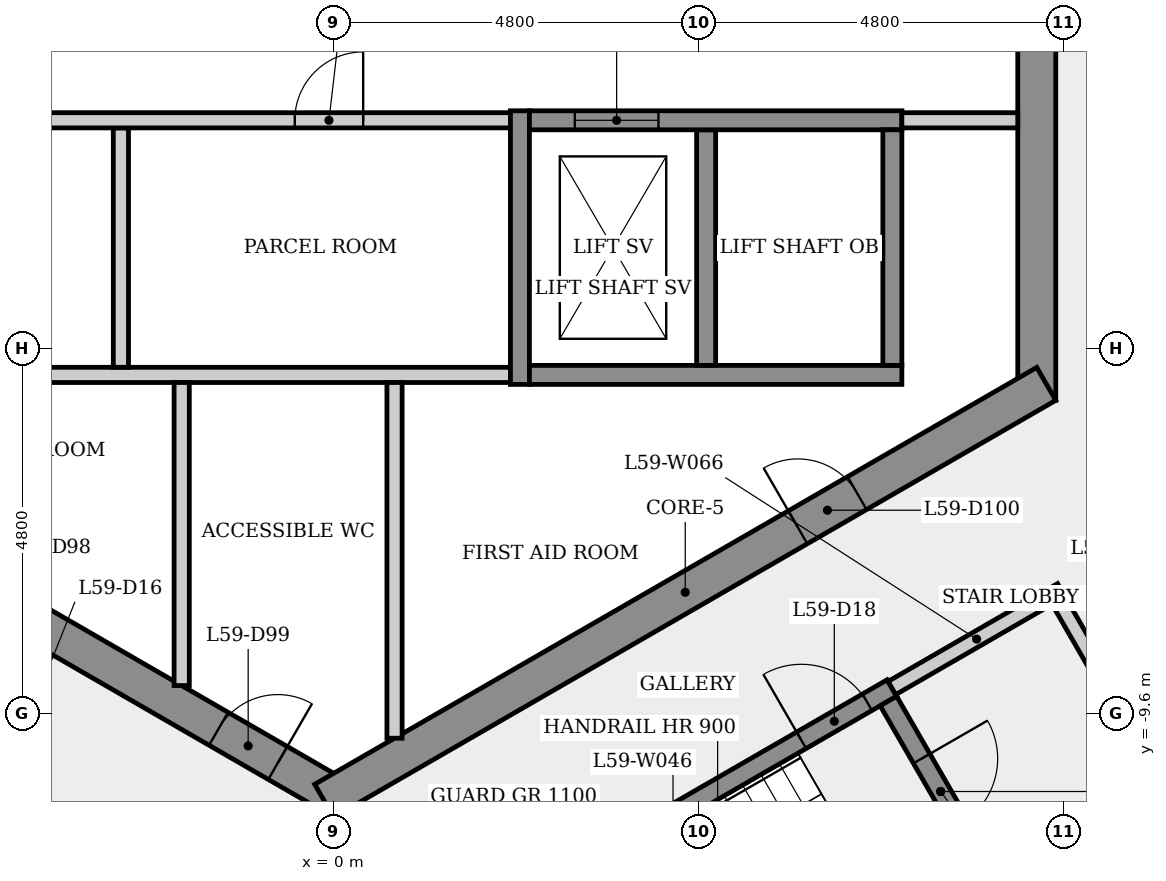
"""IFC4 building model, lengths in metres.
Left out: names, types, materials, properties, quantities, classifications, styles, units other than length and angle.
Written with IfcOpenShell. Run it as: python <this file> out.ifc"""

import sys

from ifc_helpers import new_model, si_unit, direction, frame, frame_2d, origin, place, context, subcontext, project, spatial, rectangle, extrude, element, fill, save


model = new_model("IFC4")
c1 = context("Model", 3, precision=1e-05, world=origin(), true_north=direction((0.0, 1.0)))
c2 = subcontext(c1, "Body", "Model", "MODEL_VIEW")
j1 = project(units=[si_unit("LENGTHUNIT", "METRE"), si_unit("PLANEANGLEUNIT", "RADIAN")], contexts=[c1])
p1 = place(None, origin())
s1 = spatial("IfcSite", under=j1, at=p1, CompositionType="ELEMENT")
p2 = place(p1, origin())
s2 = spatial("IfcBuilding", under=s1, at=p2, CompositionType="ELEMENT")
p3 = place(p2, frame((0.0, 0.0, 222.3)))
s3 = spatial("IfcBuildingStorey", under=s2, at=p3, CompositionType="ELEMENT", Elevation=222.3)
p4 = place(p3, frame((9.25, -5.485, 0.0), z_axis=(0.0, 0.0, 1.0), x_axis=(0.0, 1.0, 0.0)))
e1 = element("IfcWall", 1, at=p4, inside=s3, PredefinedType="SHEAR", context=c2, shape_type="SweptSolid", body=[
    extrude(rectangle(XDim=10.97, YDim=0.5, at=frame_2d((5.485, 0.0))), origin(), (0.0, 0.0, 1.0), 3.4),
])
p5 = place(p4, frame((4.685, 0.0, 0.0)))
e2 = element("IfcOpeningElement", 2, at=p5, cuts=e1, PredefinedType="OPENING", context=c2, shape_type="SweptSolid", body=[
    extrude(rectangle(XDim=1.6, YDim=2.1, at=frame_2d((0.8, 1.05))), frame((0.0, 0.26, 0.0), z_axis=(0.0, -1.0, 0.0), x_axis=(1.0, 0.0, 0.0)), (0.0, 0.0, 1.0), 0.52),
])
p6 = place(p3, frame((-9.375, -5.268, 0.0), z_axis=(0.0, 0.0, 1.0), x_axis=(0.866023993627, -0.500002442456, 0.0)))
e3 = element("IfcWall", 3, at=p6, inside=s3, PredefinedType="SHEAR", context=c2, shape_type="SweptSolid", body=[
    extrude(rectangle(XDim=10.97, YDim=0.5, at=frame_2d((5.485, 0.0))), origin(), (0.0, 0.0, 1.0), 3.4),
])
p7 = place(p6, frame((3.857, 0.0, 0.0)))
e4 = element("IfcOpeningElement", 4, at=p7, cuts=e3, PredefinedType="OPENING", context=c2, shape_type="SweptSolid", body=[
    extrude(rectangle(XDim=0.9, YDim=2.1, at=frame_2d((0.45, 1.05))), frame((0.0, 0.26, 0.0), z_axis=(0.0, -1.0, 0.0), x_axis=(1.0, 0.0, 0.0)), (0.0, 0.0, 1.0), 0.52),
])
p8 = place(p6, frame((9.076, 0.0, 0.0)))
e5 = element("IfcOpeningElement", 5, at=p8, cuts=e3, PredefinedType="OPENING", context=c2, shape_type="SweptSolid", body=[
    extrude(rectangle(XDim=0.9, YDim=2.1, at=frame_2d((0.45, 1.05))), frame((0.0, 0.26, 0.0), z_axis=(0.0, -1.0, 0.0), x_axis=(1.0, 0.0, 0.0)), (0.0, 0.0, 1.0), 0.52),
])
p9 = place(p3, frame((-0.125, -10.753, 0.0), z_axis=(0.0, 0.0, 1.0), x_axis=(0.866023993627, 0.500002442456, 0.0)))
e6 = element("IfcWall", 6, at=p9, inside=s3, PredefinedType="SHEAR", context=c2, shape_type="SweptSolid", body=[
    extrude(rectangle(XDim=10.97, YDim=0.5, at=frame_2d((5.485, 0.0))), origin(), (0.0, 0.0, 1.0), 3.4),
])
p10 = place(p9, frame((7.195, 0.0, 0.0)))
e7 = element("IfcOpeningElement", 7, at=p10, cuts=e6, PredefinedType="OPENING", context=c2, shape_type="SweptSolid", body=[
    extrude(rectangle(XDim=0.9, YDim=2.1, at=frame_2d((0.45, 1.05))), frame((0.0, 0.26, 0.0), z_axis=(0.0, -1.0, 0.0), x_axis=(1.0, 0.0, 0.0)), (0.0, 0.0, 1.0), 0.52),
])
p11 = place(p3, frame((-9.0, -5.15, 0.0), z_axis=(0.0, 0.0, 1.0), x_axis=(1.0, 0.0, 0.0)))
e8 = element("IfcWall", 8, at=p11, inside=s3, PredefinedType="PARTITIONING", context=c2, shape_type="SweptSolid", body=[
    extrude(rectangle(XDim=11.325, YDim=0.2, at=frame_2d((5.663, 0.0))), origin(), (0.0, 0.0, 1.0), 3.05),
])
p12 = place(p3, frame((-6.435, -9.795, 0.0), z_axis=(0.0, 0.0, 1.0), x_axis=(0.866012907634, -0.500021643343, 0.0)))
e9 = element("IfcWall", 9, at=p12, inside=s3, PredefinedType="PARTITIONING", context=c2, shape_type="SweptSolid", body=[
    extrude(rectangle(XDim=4.45, YDim=0.2, at=frame_2d((2.225, 0.0))), origin(), (0.0, 0.0, 1.0), 3.05),
])
p13 = place(p12, frame((1.675, 0.0, 0.0)))
e10 = element("IfcOpeningElement", 10, at=p13, cuts=e9, PredefinedType="OPENING", context=c2, shape_type="SweptSolid", body=[
    extrude(rectangle(XDim=1.1, YDim=2.1, at=frame_2d((0.55, 1.05))), frame((0.0, 0.11, 0.0), z_axis=(0.0, -1.0, 0.0), x_axis=(1.0, 0.0, 0.0)), (0.0, 0.0, 1.0), 0.22),
])
p14 = place(p3, frame((-2.8, -1.9, 0.0), z_axis=(0.0, 0.0, 1.0), x_axis=(0.0, -1.0, 0.0)))
e11 = element("IfcWall", 11, at=p14, inside=s3, PredefinedType="PARTITIONING", context=c2, shape_type="SweptSolid", body=[
    extrude(rectangle(XDim=3.15, YDim=0.2, at=frame_2d((1.575, 0.0))), origin(), (0.0, 0.0, 1.0), 3.05),
])
p15 = place(p3, frame((-9.0, -1.8, 0.0), z_axis=(0.0, 0.0, 1.0), x_axis=(1.0, 0.0, 0.0)))
e12 = element("IfcWall", 12, at=p15, inside=s3, PredefinedType="PARTITIONING", context=c2, shape_type="SweptSolid", body=[
    extrude(rectangle(XDim=11.325, YDim=0.2, at=frame_2d((5.663, 0.0))), origin(), (0.0, 0.0, 1.0), 3.05),
])
p16 = place(p15, frame((2.635, 0.0, 0.0)))
e13 = element("IfcOpeningElement", 13, at=p16, cuts=e12, PredefinedType="OPENING", context=c2, shape_type="SweptSolid", body=[
    extrude(rectangle(XDim=0.9, YDim=2.1, at=frame_2d((0.45, 1.05))), frame((0.0, 0.11, 0.0), z_axis=(0.0, -1.0, 0.0), x_axis=(1.0, 0.0, 0.0)), (0.0, 0.0, 1.0), 0.22),
])
p17 = place(p15, frame((8.488, 0.0, 0.0)))
e14 = element("IfcOpeningElement", 14, at=p17, cuts=e12, PredefinedType="OPENING", context=c2, shape_type="SweptSolid", body=[
    extrude(rectangle(XDim=0.9, YDim=2.1, at=frame_2d((0.45, 1.05))), frame((0.0, 0.11, 0.0), z_axis=(0.0, -1.0, 0.0), x_axis=(1.0, 0.0, 0.0)), (0.0, 0.0, 1.0), 0.22),
])
p18 = place(p3, frame((-2.0, -5.25, 0.0), z_axis=(0.0, 0.0, 1.0), x_axis=(0.0, -1.0, 0.0)))
e15 = element("IfcWall", 15, at=p18, inside=s3, PredefinedType="PARTITIONING", context=c2, shape_type="SweptSolid", body=[
    extrude(rectangle(XDim=3.988, YDim=0.2, at=frame_2d((1.994, 0.0))), origin(), (0.0, 0.0, 1.0), 3.05),
])
p19 = place(p3, frame((0.8, -5.25, 0.0), z_axis=(0.0, 0.0, 1.0), x_axis=(0.0, -1.0, 0.0)))
e16 = element("IfcWall", 16, at=p19, inside=s3, PredefinedType="PARTITIONING", context=c2, shape_type="SweptSolid", body=[
    extrude(rectangle(XDim=4.68, YDim=0.2, at=frame_2d((2.34, 0.0))), origin(), (0.0, 0.0, 1.0), 3.05),
])
p20 = place(p3, frame((1.585, -12.595, 0.0), z_axis=(0.0, 0.0, 1.0), x_axis=(0.866036417653, 0.499980922934, 0.0)))
e17 = element("IfcWall", 17, at=p20, inside=s3, PredefinedType="SHEAR", context=c2, shape_type="SweptSolid", body=[
    extrude(rectangle(XDim=6.65, YDim=0.25, at=frame_2d((3.325, 0.0))), origin(), (0.0, 0.0, 1.0), 3.05),
])
p21 = place(p20, frame((5.275, 0.0, 0.0)))
e18 = element("IfcOpeningElement", 18, at=p21, cuts=e17, PredefinedType="OPENING", context=c2, shape_type="SweptSolid", body=[
    extrude(rectangle(XDim=1.0, YDim=2.1, at=frame_2d((0.5, 1.05))), frame((0.0, 0.135, 0.0), z_axis=(0.0, -1.0, 0.0), x_axis=(1.0, 0.0, 0.0)), (0.0, 0.0, 1.0), 0.27),
])
p22 = place(p3, frame((2.45, -5.275, 0.0), z_axis=(0.0, 0.0, 1.0), x_axis=(0.0, 1.0, 0.0)))
e19 = element("IfcWall", 19, at=p22, inside=s3, PredefinedType="SHEAR", context=c2, shape_type="SweptSolid", body=[
    extrude(rectangle(XDim=3.6, YDim=0.25, at=frame_2d((1.8, 0.0))), origin(), (0.0, 0.0, 1.0), 3.05),
])
p23 = place(p3, frame((2.575, -5.15, 0.0), z_axis=(0.0, 0.0, 1.0), x_axis=(1.0, 0.0, 0.0)))
e20 = element("IfcWall", 20, at=p23, inside=s3, PredefinedType="SHEAR", context=c2, shape_type="SweptSolid", body=[
    extrude(rectangle(XDim=4.9, YDim=0.25, at=frame_2d((2.45, 0.0))), origin(), (0.0, 0.0, 1.0), 3.05),
])
p24 = place(p3, frame((4.9, -1.925, 0.0), z_axis=(0.0, 0.0, 1.0), x_axis=(0.0, -1.0, 0.0)))
e21 = element("IfcWall", 21, at=p24, inside=s3, PredefinedType="SHEAR", context=c2, shape_type="SweptSolid", body=[
    extrude(rectangle(XDim=3.1, YDim=0.25, at=frame_2d((1.55, 0.0))), origin(), (0.0, 0.0, 1.0), 3.4),
])
p25 = place(p3, frame((2.575, -1.8, 0.0), z_axis=(0.0, 0.0, 1.0), x_axis=(1.0, 0.0, 0.0)))
e22 = element("IfcWall", 22, at=p25, inside=s3, PredefinedType="SHEAR", context=c2, shape_type="SweptSolid", body=[
    extrude(rectangle(XDim=4.9, YDim=0.25, at=frame_2d((2.45, 0.0))), origin(), (0.0, 0.0, 1.0), 3.05),
])
p26 = place(p25, frame((0.597, 0.0, 0.0)))
e23 = element("IfcOpeningElement", 23, at=p26, cuts=e22, PredefinedType="OPENING", context=c2, shape_type="SweptSolid", body=[
    extrude(rectangle(XDim=1.1, YDim=2.1, at=frame_2d((0.55, 1.05))), frame((0.0, 0.135, 0.0), z_axis=(0.0, -1.0, 0.0), x_axis=(1.0, 0.0, 0.0)), (0.0, 0.0, 1.0), 0.27),
])
p27 = place(p3, frame((7.298, -9.441, 0.0), z_axis=(0.0, 0.0, 1.0), x_axis=(0.500034990121, -0.866005201286, 0.0)))
e24 = element("IfcWall", 24, at=p27, inside=s3, PredefinedType="SHEAR", context=c2, shape_type="SweptSolid", body=[
    extrude(rectangle(XDim=2.75, YDim=0.25, at=frame_2d((1.375, 0.0))), origin(), (0.0, 0.0, 1.0), 3.05),
])
p28 = place(p27, frame((0.875, 0.0, 0.0)))
e25 = element("IfcOpeningElement", 25, at=p28, cuts=e24, PredefinedType="OPENING", context=c2, shape_type="SweptSolid", body=[
    extrude(rectangle(XDim=1.0, YDim=2.1, at=frame_2d((0.5, 1.05))), frame((0.0, 0.135, 0.0), z_axis=(0.0, -1.0, 0.0), x_axis=(1.0, 0.0, 0.0)), (0.0, 0.0, 1.0), 0.27),
])
p29 = place(p3, frame((7.344, -9.27, 0.0), z_axis=(0.0, 0.0, 1.0), x_axis=(0.866005588531, 0.500034319456, 0.0)))
e26 = element("IfcWall", 26, at=p29, inside=s3, PredefinedType="PARTITIONING", context=c2, shape_type="SweptSolid", body=[
    extrude(rectangle(XDim=2.575, YDim=0.2, at=frame_2d((1.288, 0.0))), origin(), (0.0, 0.0, 1.0), 3.05),
])
p30 = place(p3, frame((7.35, -1.925, 0.0), z_axis=(0.0, 0.0, 1.0), x_axis=(0.0, -1.0, 0.0)))
e27 = element("IfcWall", 27, at=p30, inside=s3, PredefinedType="SHEAR", context=c2, shape_type="SweptSolid", body=[
    extrude(rectangle(XDim=3.1, YDim=0.25, at=frame_2d((1.55, 0.0))), origin(), (0.0, 0.0, 1.0), 3.4),
])
p31 = place(p3, frame((9.0, -1.8, 0.0), z_axis=(0.0, 0.0, 1.0), x_axis=(-1.0, 0.0, 0.0)))
e28 = element("IfcWall", 28, at=p31, inside=s3, PredefinedType="PARTITIONING", context=c2, shape_type="SweptSolid", body=[
    extrude(rectangle(XDim=1.525, YDim=0.2, at=frame_2d((0.763, 0.0))), origin(), (0.0, 0.0, 1.0), 3.05),
])
p32 = place(p3, frame((9.537, -8.119, 0.0), z_axis=(0.0, 0.0, 1.0), x_axis=(0.500021781351, -0.86601282795, 0.0)))
e29 = element("IfcWall", 29, at=p32, inside=s3, PredefinedType="PARTITIONING", context=c2, shape_type="SweptSolid", body=[
    extrude(rectangle(XDim=2.942, YDim=0.2, at=frame_2d((1.471, 0.0))), origin(), (0.0, 0.0, 1.0), 3.05),
])
p33 = place(p32, frame((0.916, 0.0, 0.0)))
e30 = element("IfcOpeningElement", 30, at=p33, cuts=e29, PredefinedType="OPENING", context=c2, shape_type="SweptSolid", body=[
    extrude(rectangle(XDim=1.0, YDim=2.1, at=frame_2d((0.5, 1.05))), frame((0.0, 0.11, 0.0), z_axis=(0.0, -1.0, 0.0), x_axis=(1.0, 0.0, 0.0)), (0.0, 0.0, 1.0), 0.22),
])
p34 = place(p3, frame((11.031, -10.606, 0.0), z_axis=(0.0, 0.0, 1.0), x_axis=(-0.866014894461, -0.50001820224, 0.0)))
e31 = element("IfcWall", 31, at=p34, inside=s3, PredefinedType="PARTITIONING", context=c2, shape_type="SweptSolid", body=[
    extrude(rectangle(XDim=2.525, YDim=0.2, at=frame_2d((1.262, 0.0))), origin(), (0.0, 0.0, 1.0), 3.05),
])
p35 = place(p26, origin())
e32 = element("IfcDoor", 32, at=p35, inside=s3, OperationType="SLIDING_TO_LEFT", PredefinedType="DOOR", context=c2, shape_type="SweptSolid", body=[
    extrude(rectangle(XDim=1.1, YDim=2.1, at=frame_2d((0.55, 1.05))), frame((0.0, 0.025, 0.0), z_axis=(0.0, -1.0, 0.0), x_axis=(1.0, 0.0, 0.0)), (0.0, 0.0, 1.0), 0.05),
])
fill(e23, e32)
p36 = place(p17, origin())
e33 = element("IfcDoor", 33, at=p36, inside=s3, OperationType="SINGLE_SWING_RIGHT", PredefinedType="DOOR", context=c2, shape_type="SweptSolid", body=[
    extrude(rectangle(XDim=0.9, YDim=2.1, at=frame_2d((0.45, 1.05))), frame((0.0, 0.025, 0.0), z_axis=(0.0, -1.0, 0.0), x_axis=(1.0, 0.0, 0.0)), (0.0, 0.0, 1.0), 0.05),
])
fill(e14, e33)
p37 = place(p21, origin())
e34 = element("IfcDoor", 34, at=p37, inside=s3, OperationType="SINGLE_SWING_LEFT", PredefinedType="DOOR", context=c2, shape_type="SweptSolid", body=[
    extrude(rectangle(XDim=1.0, YDim=2.1, at=frame_2d((0.5, 1.05))), frame((0.0, 0.025, 0.0), z_axis=(0.0, -1.0, 0.0), x_axis=(1.0, 0.0, 0.0)), (0.0, 0.0, 1.0), 0.05),
])
fill(e18, e34)
p38 = place(p28, origin())
e35 = element("IfcDoor", 35, at=p38, inside=s3, OperationType="SINGLE_SWING_LEFT", PredefinedType="DOOR", context=c2, shape_type="SweptSolid", body=[
    extrude(rectangle(XDim=1.0, YDim=2.1, at=frame_2d((0.5, 1.05))), frame((0.0, 0.025, 0.0), z_axis=(0.0, -1.0, 0.0), x_axis=(1.0, 0.0, 0.0)), (0.0, 0.0, 1.0), 0.05),
])
fill(e25, e35)
p39 = place(p8, origin())
e36 = element("IfcDoor", 36, at=p39, inside=s3, OperationType="SINGLE_SWING_RIGHT", PredefinedType="DOOR", context=c2, shape_type="SweptSolid", body=[
    extrude(rectangle(XDim=0.9, YDim=2.1, at=frame_2d((0.45, 1.05))), frame((0.0, 0.025, 0.0), z_axis=(0.0, -1.0, 0.0), x_axis=(1.0, 0.0, 0.0)), (0.0, 0.0, 1.0), 0.05),
])
fill(e5, e36)
p40 = place(p10, origin())
e37 = element("IfcDoor", 37, at=p40, inside=s3, OperationType="SINGLE_SWING_LEFT", PredefinedType="DOOR", context=c2, shape_type="SweptSolid", body=[
    extrude(rectangle(XDim=0.9, YDim=2.1, at=frame_2d((0.45, 1.05))), frame((0.0, 0.025, 0.0), z_axis=(0.0, -1.0, 0.0), x_axis=(1.0, 0.0, 0.0)), (0.0, 0.0, 1.0), 0.05),
])
fill(e7, e37)
save(model, sys.argv[1])
